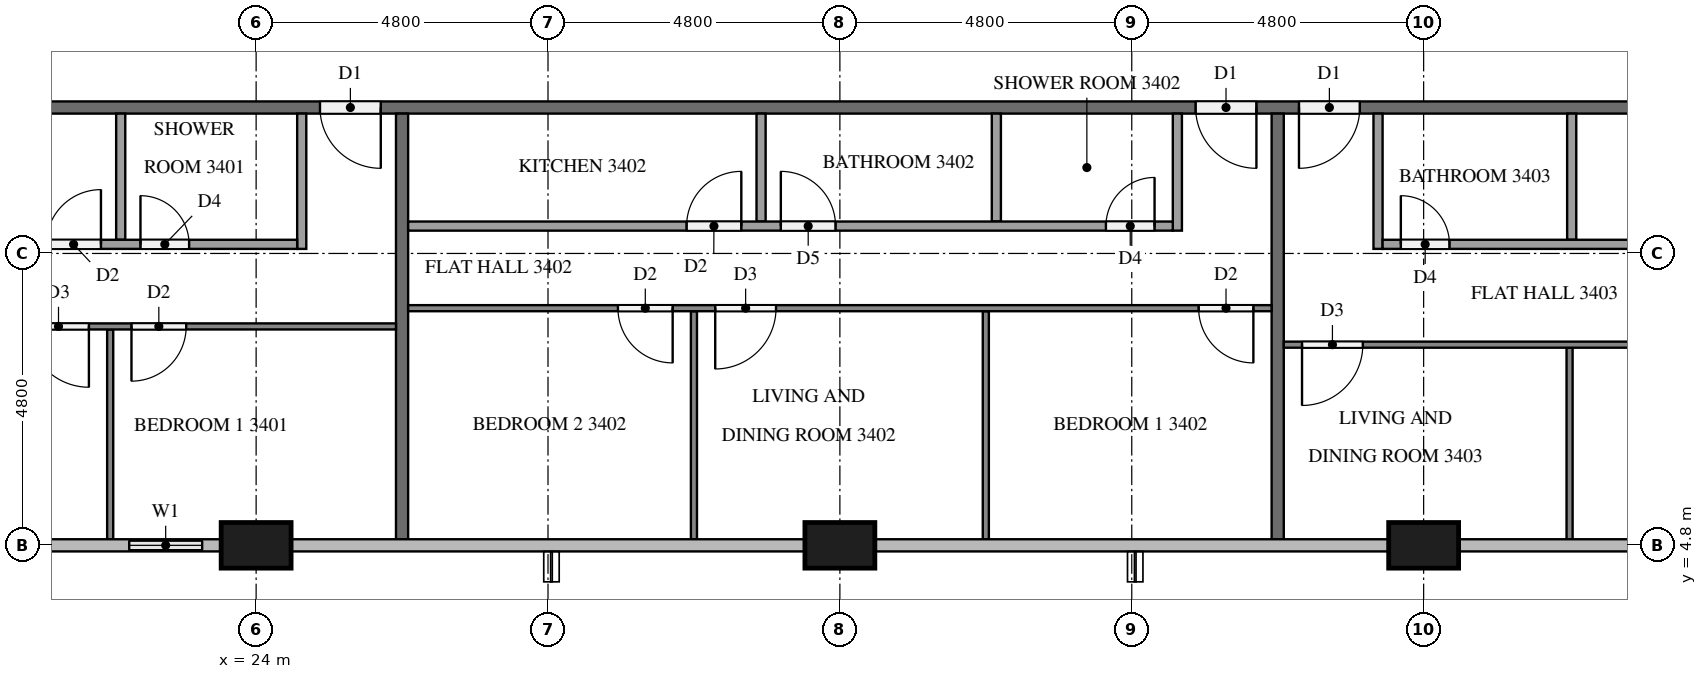
"""IFC4 building model, lengths in metres.
Left out: names, types, materials, properties, quantities, classifications, styles, units other than length and angle.
Written with IfcOpenShell. Run it as: python <this file> out.ifc"""

import sys

from ifc_helpers import new_model, si_unit, direction, frame, frame_2d, origin, origin_2d, place, context, subcontext, project, spatial, rectangle, extrude, element, fill, save


model = new_model("IFC4")
c1 = context("Model", 3, precision=1e-05, world=origin(), true_north=direction((0.0, 1.0)))
c2 = subcontext(c1, "Body", "Model", "MODEL_VIEW")
j1 = project(units=[si_unit("LENGTHUNIT", "METRE"), si_unit("PLANEANGLEUNIT", "RADIAN")], contexts=[c1])
p1 = place(None, origin())
s1 = spatial("IfcSite", under=j1, at=p1, CompositionType="ELEMENT")
p2 = place(p1, origin())
s2 = spatial("IfcBuilding", under=s1, at=p2, CompositionType="ELEMENT")
p3 = place(p2, frame((0.0, 0.0, 133.1)))
s3 = spatial("IfcBuildingStorey", under=s2, at=p3, CompositionType="ELEMENT", Elevation=133.1)
for number, where, z_axis, x_axis in (
    (1, (24.0, 4.8, 0.0), (0.0, 0.0, 1.0), (1.0, 0.0, 0.0)),
    (2, (33.6, 4.8, 0.0), (0.0, 0.0, 1.0), (1.0, 0.0, 0.0)),
    (3, (43.2, 4.8, 0.0), (0.0, 0.0, 1.0), (1.0, 0.0, 0.0)),
):
    element("IfcColumn", number, at=place(p3, frame(where, z_axis=z_axis, x_axis=x_axis)), inside=s3, PredefinedType="COLUMN", context=c2, shape_type="SweptSolid", body=[
        extrude(rectangle(XDim=1.15, YDim=0.75, at=origin_2d()), origin(), (0.0, 0.0, 1.0), 3.2),
    ])
p4 = place(p3, frame((21.6, 4.8, 0.0), z_axis=(0.0, 0.0, 1.0), x_axis=(1.0, 0.0, 0.0)))
e4 = element("IfcWall", 4, at=p4, inside=s3, PredefinedType="SOLIDWALL", context=c2, shape_type="SweptSolid", body=[
    extrude(rectangle(XDim=1.825, YDim=0.15, at=frame_2d((0.913, 0.0))), origin(), (0.0, 0.0, 1.0), 3.2),
])
p5 = place(p4, frame((0.312, 0.0, 0.9)))
e5 = element("IfcOpeningElement", 5, at=p5, cuts=e4, PredefinedType="OPENING", context=c2, shape_type="SweptSolid", body=[
    extrude(rectangle(XDim=1.2, YDim=1.4, at=frame_2d((0.6, 0.7))), frame((0.0, 0.085, 0.0), z_axis=(0.0, -1.0, 0.0), x_axis=(1.0, 0.0, 0.0)), (0.0, 0.0, 1.0), 0.17),
])
p6 = place(p3, frame((50.5, 12.0, 0.0), z_axis=(0.0, 0.0, 1.0), x_axis=(-1.0, 0.0, 0.0)))
e6 = element("IfcWall", 6, at=p6, inside=s3, PredefinedType="PARTITIONING", context=c2, shape_type="SweptSolid", body=[
    extrude(rectangle(XDim=38.6, YDim=0.2, at=frame_2d((19.3, 0.0))), origin(), (0.0, 0.0, 1.0), 3.2),
])
p7 = place(p6, frame((24.45, 0.0, 0.0)))
e7 = element("IfcOpeningElement", 7, at=p7, cuts=e6, PredefinedType="OPENING", context=c2, shape_type="SweptSolid", body=[
    extrude(rectangle(XDim=1.0, YDim=2.1, at=frame_2d((0.5, 1.05))), frame((0.0, 0.11, 0.0), z_axis=(0.0, -1.0, 0.0), x_axis=(1.0, 0.0, 0.0)), (0.0, 0.0, 1.0), 0.22),
])
p8 = place(p6, frame((10.05, 0.0, 0.0)))
e8 = element("IfcOpeningElement", 8, at=p8, cuts=e6, PredefinedType="OPENING", context=c2, shape_type="SweptSolid", body=[
    extrude(rectangle(XDim=1.0, YDim=2.1, at=frame_2d((0.5, 1.05))), frame((0.0, 0.11, 0.0), z_axis=(0.0, -1.0, 0.0), x_axis=(1.0, 0.0, 0.0)), (0.0, 0.0, 1.0), 0.22),
])
p9 = place(p6, frame((8.35, 0.0, 0.0)))
e9 = element("IfcOpeningElement", 9, at=p9, cuts=e6, PredefinedType="OPENING", context=c2, shape_type="SweptSolid", body=[
    extrude(rectangle(XDim=1.0, YDim=2.1, at=frame_2d((0.5, 1.05))), frame((0.0, 0.11, 0.0), z_axis=(0.0, -1.0, 0.0), x_axis=(1.0, 0.0, 0.0)), (0.0, 0.0, 1.0), 0.22),
])
for number, where, z_axis, x_axis in (
    (10, (26.4, 11.9, 0.0), (0.0, 0.0, 1.0), (0.0, -1.0, 0.0)),
    (11, (40.8, 11.9, 0.0), (0.0, 0.0, 1.0), (0.0, -1.0, 0.0)),
):
    element("IfcWall", number, at=place(p3, frame(where, z_axis=z_axis, x_axis=x_axis)), inside=s3, PredefinedType="PARTITIONING", context=c2, shape_type="SweptSolid", body=[
        extrude(rectangle(XDim=7.0, YDim=0.2, at=frame_2d((3.5, 0.0))), origin(), (0.0, 0.0, 1.0), 3.2),
    ])
p10 = place(p3, frame((21.6, 8.35, 0.0), z_axis=(0.0, 0.0, 1.0), x_axis=(0.0, -1.0, 0.0)))
e12 = element("IfcWall", 12, at=p10, inside=s3, PredefinedType="PARTITIONING", context=c2, shape_type="SweptSolid", body=[
    extrude(rectangle(XDim=3.45, YDim=0.1, at=frame_2d((1.725, 0.0))), origin(), (0.0, 0.0, 1.0), 3.2),
])
p11 = place(p3, frame((26.3, 8.4, 0.0), z_axis=(0.0, 0.0, 1.0), x_axis=(-1.0, 0.0, 0.0)))
e13 = element("IfcWall", 13, at=p11, inside=s3, PredefinedType="PARTITIONING", context=c2, shape_type="SweptSolid", body=[
    extrude(rectangle(XDim=14.2, YDim=0.1, at=frame_2d((7.1, 0.0))), origin(), (0.0, 0.0, 1.0), 3.2),
])
p12 = place(p11, frame((3.45, 0.0, 0.0)))
e14 = element("IfcOpeningElement", 14, at=p12, cuts=e13, PredefinedType="OPENING", context=c2, shape_type="SweptSolid", body=[
    extrude(rectangle(XDim=0.9, YDim=2.1, at=frame_2d((0.45, 1.05))), frame((0.0, 0.06, 0.0), z_axis=(0.0, -1.0, 0.0), x_axis=(1.0, 0.0, 0.0)), (0.0, 0.0, 1.0), 0.12),
])
p13 = place(p11, frame((5.05, 0.0, 0.0)))
e15 = element("IfcOpeningElement", 15, at=p13, cuts=e13, PredefinedType="OPENING", context=c2, shape_type="SweptSolid", body=[
    extrude(rectangle(XDim=1.0, YDim=2.1, at=frame_2d((0.5, 1.05))), frame((0.0, 0.06, 0.0), z_axis=(0.0, -1.0, 0.0), x_axis=(1.0, 0.0, 0.0)), (0.0, 0.0, 1.0), 0.12),
])
p14 = place(p11, frame((13.0, 0.0, 0.0)))
e16 = element("IfcOpeningElement", 16, at=p14, cuts=e13, PredefinedType="OPENING", context=c2, shape_type="SweptSolid", body=[
    extrude(rectangle(XDim=0.9, YDim=2.1, at=frame_2d((0.45, 1.05))), frame((0.0, 0.06, 0.0), z_axis=(0.0, -1.0, 0.0), x_axis=(1.0, 0.0, 0.0)), (0.0, 0.0, 1.0), 0.12),
])
p15 = place(p3, frame((21.773, 11.9, 0.0), z_axis=(0.0, 0.0, 1.0), x_axis=(0.0, -1.0, 0.0)))
e17 = element("IfcWall", 17, at=p15, inside=s3, PredefinedType="PARTITIONING", context=c2, shape_type="SweptSolid", body=[
    extrude(rectangle(XDim=2.075, YDim=0.15, at=frame_2d((1.038, 0.0))), origin(), (0.0, 0.0, 1.0), 3.2),
])
p16 = place(p3, frame((24.75, 11.9, 0.0), z_axis=(0.0, 0.0, 1.0), x_axis=(0.0, -1.0, 0.0)))
e18 = element("IfcWall", 18, at=p16, inside=s3, PredefinedType="PARTITIONING", context=c2, shape_type="SweptSolid", body=[
    extrude(rectangle(XDim=2.225, YDim=0.15, at=frame_2d((1.112, 0.0))), origin(), (0.0, 0.0, 1.0), 3.2),
])
p17 = place(p3, frame((12.1, 9.75, 0.0), z_axis=(0.0, 0.0, 1.0), x_axis=(1.0, 0.0, 0.0)))
e19 = element("IfcWall", 19, at=p17, inside=s3, PredefinedType="PARTITIONING", context=c2, shape_type="SweptSolid", body=[
    extrude(rectangle(XDim=12.575, YDim=0.15, at=frame_2d((6.288, 0.0))), origin(), (0.0, 0.0, 1.0), 3.2),
])
p18 = place(p17, frame((9.998, 0.0, 0.0)))
e20 = element("IfcOpeningElement", 20, at=p18, cuts=e19, PredefinedType="OPENING", context=c2, shape_type="SweptSolid", body=[
    extrude(rectangle(XDim=0.8, YDim=2.1, at=frame_2d((0.4, 1.05))), frame((0.0, 0.085, 0.0), z_axis=(0.0, -1.0, 0.0), x_axis=(1.0, 0.0, 0.0)), (0.0, 0.0, 1.0), 0.17),
])
p19 = place(p17, frame((8.448, 0.0, 0.0)))
e21 = element("IfcOpeningElement", 21, at=p19, cuts=e19, PredefinedType="OPENING", context=c2, shape_type="SweptSolid", body=[
    extrude(rectangle(XDim=0.9, YDim=2.1, at=frame_2d((0.45, 1.05))), frame((0.0, 0.085, 0.0), z_axis=(0.0, -1.0, 0.0), x_axis=(1.0, 0.0, 0.0)), (0.0, 0.0, 1.0), 0.17),
])
p20 = place(p17, frame((0.35, 0.0, 0.0)))
e22 = element("IfcOpeningElement", 22, at=p20, cuts=e19, PredefinedType="OPENING", context=c2, shape_type="SweptSolid", body=[
    extrude(rectangle(XDim=0.9, YDim=2.1, at=frame_2d((0.45, 1.05))), frame((0.0, 0.085, 0.0), z_axis=(0.0, -1.0, 0.0), x_axis=(1.0, 0.0, 0.0)), (0.0, 0.0, 1.0), 0.17),
])
for number, where, z_axis, x_axis in (
    (23, (36.0, 8.65, 0.0), (0.0, 0.0, 1.0), (0.0, -1.0, 0.0)),
    (24, (31.2, 8.65, 0.0), (0.0, 0.0, 1.0), (0.0, -1.0, 0.0)),
):
    element("IfcWall", number, at=place(p3, frame(where, z_axis=z_axis, x_axis=x_axis)), inside=s3, PredefinedType="PARTITIONING", context=c2, shape_type="SweptSolid", body=[
        extrude(rectangle(XDim=3.75, YDim=0.1, at=frame_2d((1.875, 0.0))), origin(), (0.0, 0.0, 1.0), 3.2),
    ])
p21 = place(p3, frame((40.7, 8.7, 0.0), z_axis=(0.0, 0.0, 1.0), x_axis=(-1.0, 0.0, 0.0)))
e25 = element("IfcWall", 25, at=p21, inside=s3, PredefinedType="PARTITIONING", context=c2, shape_type="SweptSolid", body=[
    extrude(rectangle(XDim=14.2, YDim=0.1, at=frame_2d((7.1, 0.0))), origin(), (0.0, 0.0, 1.0), 3.2),
])
p22 = place(p21, frame((0.3, 0.0, 0.0)))
e26 = element("IfcOpeningElement", 26, at=p22, cuts=e25, PredefinedType="OPENING", context=c2, shape_type="SweptSolid", body=[
    extrude(rectangle(XDim=0.9, YDim=2.1, at=frame_2d((0.45, 1.05))), frame((0.0, 0.06, 0.0), z_axis=(0.0, -1.0, 0.0), x_axis=(1.0, 0.0, 0.0)), (0.0, 0.0, 1.0), 0.12),
])
p23 = place(p21, frame((8.15, 0.0, 0.0)))
e27 = element("IfcOpeningElement", 27, at=p23, cuts=e25, PredefinedType="OPENING", context=c2, shape_type="SweptSolid", body=[
    extrude(rectangle(XDim=1.0, YDim=2.1, at=frame_2d((0.5, 1.05))), frame((0.0, 0.06, 0.0), z_axis=(0.0, -1.0, 0.0), x_axis=(1.0, 0.0, 0.0)), (0.0, 0.0, 1.0), 0.12),
])
p24 = place(p21, frame((9.85, 0.0, 0.0)))
e28 = element("IfcOpeningElement", 28, at=p24, cuts=e25, PredefinedType="OPENING", context=c2, shape_type="SweptSolid", body=[
    extrude(rectangle(XDim=0.9, YDim=2.1, at=frame_2d((0.45, 1.05))), frame((0.0, 0.06, 0.0), z_axis=(0.0, -1.0, 0.0), x_axis=(1.0, 0.0, 0.0)), (0.0, 0.0, 1.0), 0.12),
])
for number, where, z_axis, x_axis in (
    (29, (36.173, 11.9, 0.0), (0.0, 0.0, 1.0), (0.0, -1.0, 0.0)),
    (30, (32.304, 11.9, 0.0), (0.0, 0.0, 1.0), (0.0, -1.0, 0.0)),
):
    element("IfcWall", number, at=place(p3, frame(where, z_axis=z_axis, x_axis=x_axis)), inside=s3, PredefinedType="PARTITIONING", context=c2, shape_type="SweptSolid", body=[
        extrude(rectangle(XDim=1.775, YDim=0.15, at=frame_2d((0.887, 0.0))), origin(), (0.0, 0.0, 1.0), 3.2),
    ])
p25 = place(p3, frame((39.15, 11.9, 0.0), z_axis=(0.0, 0.0, 1.0), x_axis=(0.0, -1.0, 0.0)))
e31 = element("IfcWall", 31, at=p25, inside=s3, PredefinedType="PARTITIONING", context=c2, shape_type="SweptSolid", body=[
    extrude(rectangle(XDim=1.925, YDim=0.15, at=frame_2d((0.962, 0.0))), origin(), (0.0, 0.0, 1.0), 3.2),
])
p26 = place(p3, frame((26.5, 10.05, 0.0), z_axis=(0.0, 0.0, 1.0), x_axis=(1.0, 0.0, 0.0)))
e32 = element("IfcWall", 32, at=p26, inside=s3, PredefinedType="PARTITIONING", context=c2, shape_type="SweptSolid", body=[
    extrude(rectangle(XDim=12.575, YDim=0.15, at=frame_2d((6.288, 0.0))), origin(), (0.0, 0.0, 1.0), 3.2),
])
p27 = place(p26, frame((11.475, 0.0, 0.0)))
e33 = element("IfcOpeningElement", 33, at=p27, cuts=e32, PredefinedType="OPENING", context=c2, shape_type="SweptSolid", body=[
    extrude(rectangle(XDim=0.8, YDim=2.1, at=frame_2d((0.4, 1.05))), frame((0.0, 0.085, 0.0), z_axis=(0.0, -1.0, 0.0), x_axis=(1.0, 0.0, 0.0)), (0.0, 0.0, 1.0), 0.17),
])
p28 = place(p26, frame((6.129, 0.0, 0.0)))
e34 = element("IfcOpeningElement", 34, at=p28, cuts=e32, PredefinedType="OPENING", context=c2, shape_type="SweptSolid", body=[
    extrude(rectangle(XDim=0.9, YDim=2.1, at=frame_2d((0.45, 1.05))), frame((0.0, 0.085, 0.0), z_axis=(0.0, -1.0, 0.0), x_axis=(1.0, 0.0, 0.0)), (0.0, 0.0, 1.0), 0.17),
])
p29 = place(p26, frame((4.579, 0.0, 0.0)))
e35 = element("IfcOpeningElement", 35, at=p29, cuts=e32, PredefinedType="OPENING", context=c2, shape_type="SweptSolid", body=[
    extrude(rectangle(XDim=0.9, YDim=2.1, at=frame_2d((0.45, 1.05))), frame((0.0, 0.085, 0.0), z_axis=(0.0, -1.0, 0.0), x_axis=(1.0, 0.0, 0.0)), (0.0, 0.0, 1.0), 0.17),
])
p30 = place(p3, frame((45.6, 8.05, 0.0), z_axis=(0.0, 0.0, 1.0), x_axis=(0.0, -1.0, 0.0)))
e36 = element("IfcWall", 36, at=p30, inside=s3, PredefinedType="PARTITIONING", context=c2, shape_type="SweptSolid", body=[
    extrude(rectangle(XDim=3.15, YDim=0.1, at=frame_2d((1.575, 0.0))), origin(), (0.0, 0.0, 1.0), 3.2),
])
p31 = place(p3, frame((50.3, 8.1, 0.0), z_axis=(0.0, 0.0, 1.0), x_axis=(-1.0, 0.0, 0.0)))
e37 = element("IfcWall", 37, at=p31, inside=s3, PredefinedType="PARTITIONING", context=c2, shape_type="SweptSolid", body=[
    extrude(rectangle(XDim=9.4, YDim=0.1, at=frame_2d((4.7, 0.0))), origin(), (0.0, 0.0, 1.0), 3.2),
])
p32 = place(p31, frame((8.1, 0.0, 0.0)))
e38 = element("IfcOpeningElement", 38, at=p32, cuts=e37, PredefinedType="OPENING", context=c2, shape_type="SweptSolid", body=[
    extrude(rectangle(XDim=1.0, YDim=2.1, at=frame_2d((0.5, 1.05))), frame((0.0, 0.06, 0.0), z_axis=(0.0, -1.0, 0.0), x_axis=(1.0, 0.0, 0.0)), (0.0, 0.0, 1.0), 0.12),
])
p33 = place(p31, frame((0.3, 0.0, 0.0)))
e39 = element("IfcOpeningElement", 39, at=p33, cuts=e37, PredefinedType="OPENING", context=c2, shape_type="SweptSolid", body=[
    extrude(rectangle(XDim=0.9, YDim=2.1, at=frame_2d((0.45, 1.05))), frame((0.0, 0.06, 0.0), z_axis=(0.0, -1.0, 0.0), x_axis=(1.0, 0.0, 0.0)), (0.0, 0.0, 1.0), 0.12),
])
p34 = place(p3, frame((45.635, 11.9, 0.0), z_axis=(0.0, 0.0, 1.0), x_axis=(0.0, -1.0, 0.0)))
e40 = element("IfcWall", 40, at=p34, inside=s3, PredefinedType="PARTITIONING", context=c2, shape_type="SweptSolid", body=[
    extrude(rectangle(XDim=2.075, YDim=0.15, at=frame_2d((1.038, 0.0))), origin(), (0.0, 0.0, 1.0), 3.2),
])
p35 = place(p3, frame((42.45, 11.9, 0.0), z_axis=(0.0, 0.0, 1.0), x_axis=(0.0, -1.0, 0.0)))
e41 = element("IfcWall", 41, at=p35, inside=s3, PredefinedType="PARTITIONING", context=c2, shape_type="SweptSolid", body=[
    extrude(rectangle(XDim=2.225, YDim=0.15, at=frame_2d((1.112, 0.0))), origin(), (0.0, 0.0, 1.0), 3.2),
])
p36 = place(p3, frame((42.525, 9.75, 0.0), z_axis=(0.0, 0.0, 1.0), x_axis=(1.0, 0.0, 0.0)))
e42 = element("IfcWall", 42, at=p36, inside=s3, PredefinedType="PARTITIONING", context=c2, shape_type="SweptSolid", body=[
    extrude(rectangle(XDim=7.775, YDim=0.15, at=frame_2d((3.888, 0.0))), origin(), (0.0, 0.0, 1.0), 3.2),
])
p37 = place(p36, frame((0.3, 0.0, 0.0)))
e43 = element("IfcOpeningElement", 43, at=p37, cuts=e42, PredefinedType="OPENING", context=c2, shape_type="SweptSolid", body=[
    extrude(rectangle(XDim=0.8, YDim=2.1, at=frame_2d((0.4, 1.05))), frame((0.0, 0.085, 0.0), z_axis=(0.0, -1.0, 0.0), x_axis=(1.0, 0.0, 0.0)), (0.0, 0.0, 1.0), 0.17),
])
p38 = place(p36, frame((6.525, 0.0, 0.0)))
e44 = element("IfcOpeningElement", 44, at=p38, cuts=e42, PredefinedType="OPENING", context=c2, shape_type="SweptSolid", body=[
    extrude(rectangle(XDim=0.9, YDim=2.1, at=frame_2d((0.45, 1.05))), frame((0.0, 0.085, 0.0), z_axis=(0.0, -1.0, 0.0), x_axis=(1.0, 0.0, 0.0)), (0.0, 0.0, 1.0), 0.17),
])
p39 = place(p5, origin())
e45 = element("IfcWindow", 45, at=p39, inside=s3, PartitioningType="SINGLE_PANEL", PredefinedType="WINDOW", context=c2, shape_type="SweptSolid", body=[
    extrude(rectangle(XDim=1.2, YDim=1.4, at=frame_2d((0.6, 0.7))), frame((0.0, 0.03, 0.0), z_axis=(0.0, -1.0, 0.0), x_axis=(1.0, 0.0, 0.0)), (0.0, 0.0, 1.0), 0.06),
])
fill(e5, e45)
p40 = place(p7, origin())
e46 = element("IfcDoor", 46, at=p40, inside=s3, OperationType="SINGLE_SWING_LEFT", PredefinedType="DOOR", context=c2, shape_type="SweptSolid", body=[
    extrude(rectangle(XDim=1.0, YDim=2.1, at=frame_2d((0.5, 1.05))), frame((0.0, 0.025, 0.0), z_axis=(0.0, -1.0, 0.0), x_axis=(1.0, 0.0, 0.0)), (0.0, 0.0, 1.0), 0.05),
])
fill(e7, e46)
p41 = place(p8, origin())
e47 = element("IfcDoor", 47, at=p41, inside=s3, OperationType="SINGLE_SWING_LEFT", PredefinedType="DOOR", context=c2, shape_type="SweptSolid", body=[
    extrude(rectangle(XDim=1.0, YDim=2.1, at=frame_2d((0.5, 1.05))), frame((0.0, 0.025, 0.0), z_axis=(0.0, -1.0, 0.0), x_axis=(1.0, 0.0, 0.0)), (0.0, 0.0, 1.0), 0.05),
])
fill(e8, e47)
p42 = place(p9, origin())
e48 = element("IfcDoor", 48, at=p42, inside=s3, OperationType="SINGLE_SWING_RIGHT", PredefinedType="DOOR", context=c2, shape_type="SweptSolid", body=[
    extrude(rectangle(XDim=1.0, YDim=2.1, at=frame_2d((0.5, 1.05))), frame((0.0, 0.025, 0.0), z_axis=(0.0, -1.0, 0.0), x_axis=(1.0, 0.0, 0.0)), (0.0, 0.0, 1.0), 0.05),
])
fill(e9, e48)
p43 = place(p12, origin())
e49 = element("IfcDoor", 49, at=p43, inside=s3, OperationType="SINGLE_SWING_RIGHT", PredefinedType="DOOR", context=c2, shape_type="SweptSolid", body=[
    extrude(rectangle(XDim=0.9, YDim=2.1, at=frame_2d((0.45, 1.05))), frame((0.0, 0.025, 0.0), z_axis=(0.0, -1.0, 0.0), x_axis=(1.0, 0.0, 0.0)), (0.0, 0.0, 1.0), 0.05),
])
fill(e14, e49)
p44 = place(p13, origin())
e50 = element("IfcDoor", 50, at=p44, inside=s3, OperationType="SINGLE_SWING_LEFT", PredefinedType="DOOR", context=c2, shape_type="SweptSolid", body=[
    extrude(rectangle(XDim=1.0, YDim=2.1, at=frame_2d((0.5, 1.05))), frame((0.0, 0.025, 0.0), z_axis=(0.0, -1.0, 0.0), x_axis=(1.0, 0.0, 0.0)), (0.0, 0.0, 1.0), 0.05),
])
fill(e15, e50)
p45 = place(p18, origin())
e51 = element("IfcDoor", 51, at=p45, inside=s3, OperationType="SINGLE_SWING_LEFT", PredefinedType="DOOR", context=c2, shape_type="SweptSolid", body=[
    extrude(rectangle(XDim=0.8, YDim=2.1, at=frame_2d((0.4, 1.05))), frame((0.0, 0.025, 0.0), z_axis=(0.0, -1.0, 0.0), x_axis=(1.0, 0.0, 0.0)), (0.0, 0.0, 1.0), 0.05),
])
fill(e20, e51)
p46 = place(p19, origin())
e52 = element("IfcDoor", 52, at=p46, inside=s3, OperationType="SINGLE_SWING_RIGHT", PredefinedType="DOOR", context=c2, shape_type="SweptSolid", body=[
    extrude(rectangle(XDim=0.9, YDim=2.1, at=frame_2d((0.45, 1.05))), frame((0.0, 0.025, 0.0), z_axis=(0.0, -1.0, 0.0), x_axis=(1.0, 0.0, 0.0)), (0.0, 0.0, 1.0), 0.05),
])
fill(e21, e52)
p47 = place(p22, origin())
e53 = element("IfcDoor", 53, at=p47, inside=s3, OperationType="SINGLE_SWING_LEFT", PredefinedType="DOOR", context=c2, shape_type="SweptSolid", body=[
    extrude(rectangle(XDim=0.9, YDim=2.1, at=frame_2d((0.45, 1.05))), frame((0.0, 0.025, 0.0), z_axis=(0.0, -1.0, 0.0), x_axis=(1.0, 0.0, 0.0)), (0.0, 0.0, 1.0), 0.05),
])
fill(e26, e53)
p48 = place(p23, origin())
e54 = element("IfcDoor", 54, at=p48, inside=s3, OperationType="SINGLE_SWING_RIGHT", PredefinedType="DOOR", context=c2, shape_type="SweptSolid", body=[
    extrude(rectangle(XDim=1.0, YDim=2.1, at=frame_2d((0.5, 1.05))), frame((0.0, 0.025, 0.0), z_axis=(0.0, -1.0, 0.0), x_axis=(1.0, 0.0, 0.0)), (0.0, 0.0, 1.0), 0.05),
])
fill(e27, e54)
p49 = place(p24, origin())
e55 = element("IfcDoor", 55, at=p49, inside=s3, OperationType="SINGLE_SWING_LEFT", PredefinedType="DOOR", context=c2, shape_type="SweptSolid", body=[
    extrude(rectangle(XDim=0.9, YDim=2.1, at=frame_2d((0.45, 1.05))), frame((0.0, 0.025, 0.0), z_axis=(0.0, -1.0, 0.0), x_axis=(1.0, 0.0, 0.0)), (0.0, 0.0, 1.0), 0.05),
])
fill(e28, e55)
p50 = place(p27, origin())
e56 = element("IfcDoor", 56, at=p50, inside=s3, OperationType="SINGLE_SWING_RIGHT", PredefinedType="DOOR", context=c2, shape_type="SweptSolid", body=[
    extrude(rectangle(XDim=0.8, YDim=2.1, at=frame_2d((0.4, 1.05))), frame((0.0, 0.025, 0.0), z_axis=(0.0, -1.0, 0.0), x_axis=(1.0, 0.0, 0.0)), (0.0, 0.0, 1.0), 0.05),
])
fill(e33, e56)
p51 = place(p28, origin())
e57 = element("IfcDoor", 57, at=p51, inside=s3, OperationType="SINGLE_SWING_LEFT", PredefinedType="DOOR", context=c2, shape_type="SweptSolid", body=[
    extrude(rectangle(XDim=0.9, YDim=2.1, at=frame_2d((0.45, 1.05))), frame((0.0, 0.025, 0.0), z_axis=(0.0, -1.0, 0.0), x_axis=(1.0, 0.0, 0.0)), (0.0, 0.0, 1.0), 0.05),
])
fill(e34, e57)
p52 = place(p29, origin())
e58 = element("IfcDoor", 58, at=p52, inside=s3, OperationType="SINGLE_SWING_RIGHT", PredefinedType="DOOR", context=c2, shape_type="SweptSolid", body=[
    extrude(rectangle(XDim=0.9, YDim=2.1, at=frame_2d((0.45, 1.05))), frame((0.0, 0.025, 0.0), z_axis=(0.0, -1.0, 0.0), x_axis=(1.0, 0.0, 0.0)), (0.0, 0.0, 1.0), 0.05),
])
fill(e35, e58)
p53 = place(p32, origin())
e59 = element("IfcDoor", 59, at=p53, inside=s3, OperationType="SINGLE_SWING_RIGHT", PredefinedType="DOOR", context=c2, shape_type="SweptSolid", body=[
    extrude(rectangle(XDim=1.0, YDim=2.1, at=frame_2d((0.5, 1.05))), frame((0.0, 0.025, 0.0), z_axis=(0.0, -1.0, 0.0), x_axis=(1.0, 0.0, 0.0)), (0.0, 0.0, 1.0), 0.05),
])
fill(e38, e59)
p54 = place(p37, origin())
e60 = element("IfcDoor", 60, at=p54, inside=s3, OperationType="SINGLE_SWING_LEFT", PredefinedType="DOOR", context=c2, shape_type="SweptSolid", body=[
    extrude(rectangle(XDim=0.8, YDim=2.1, at=frame_2d((0.4, 1.05))), frame((0.0, 0.025, 0.0), z_axis=(0.0, -1.0, 0.0), x_axis=(1.0, 0.0, 0.0)), (0.0, 0.0, 1.0), 0.05),
])
fill(e43, e60)
save(model, sys.argv[1])
